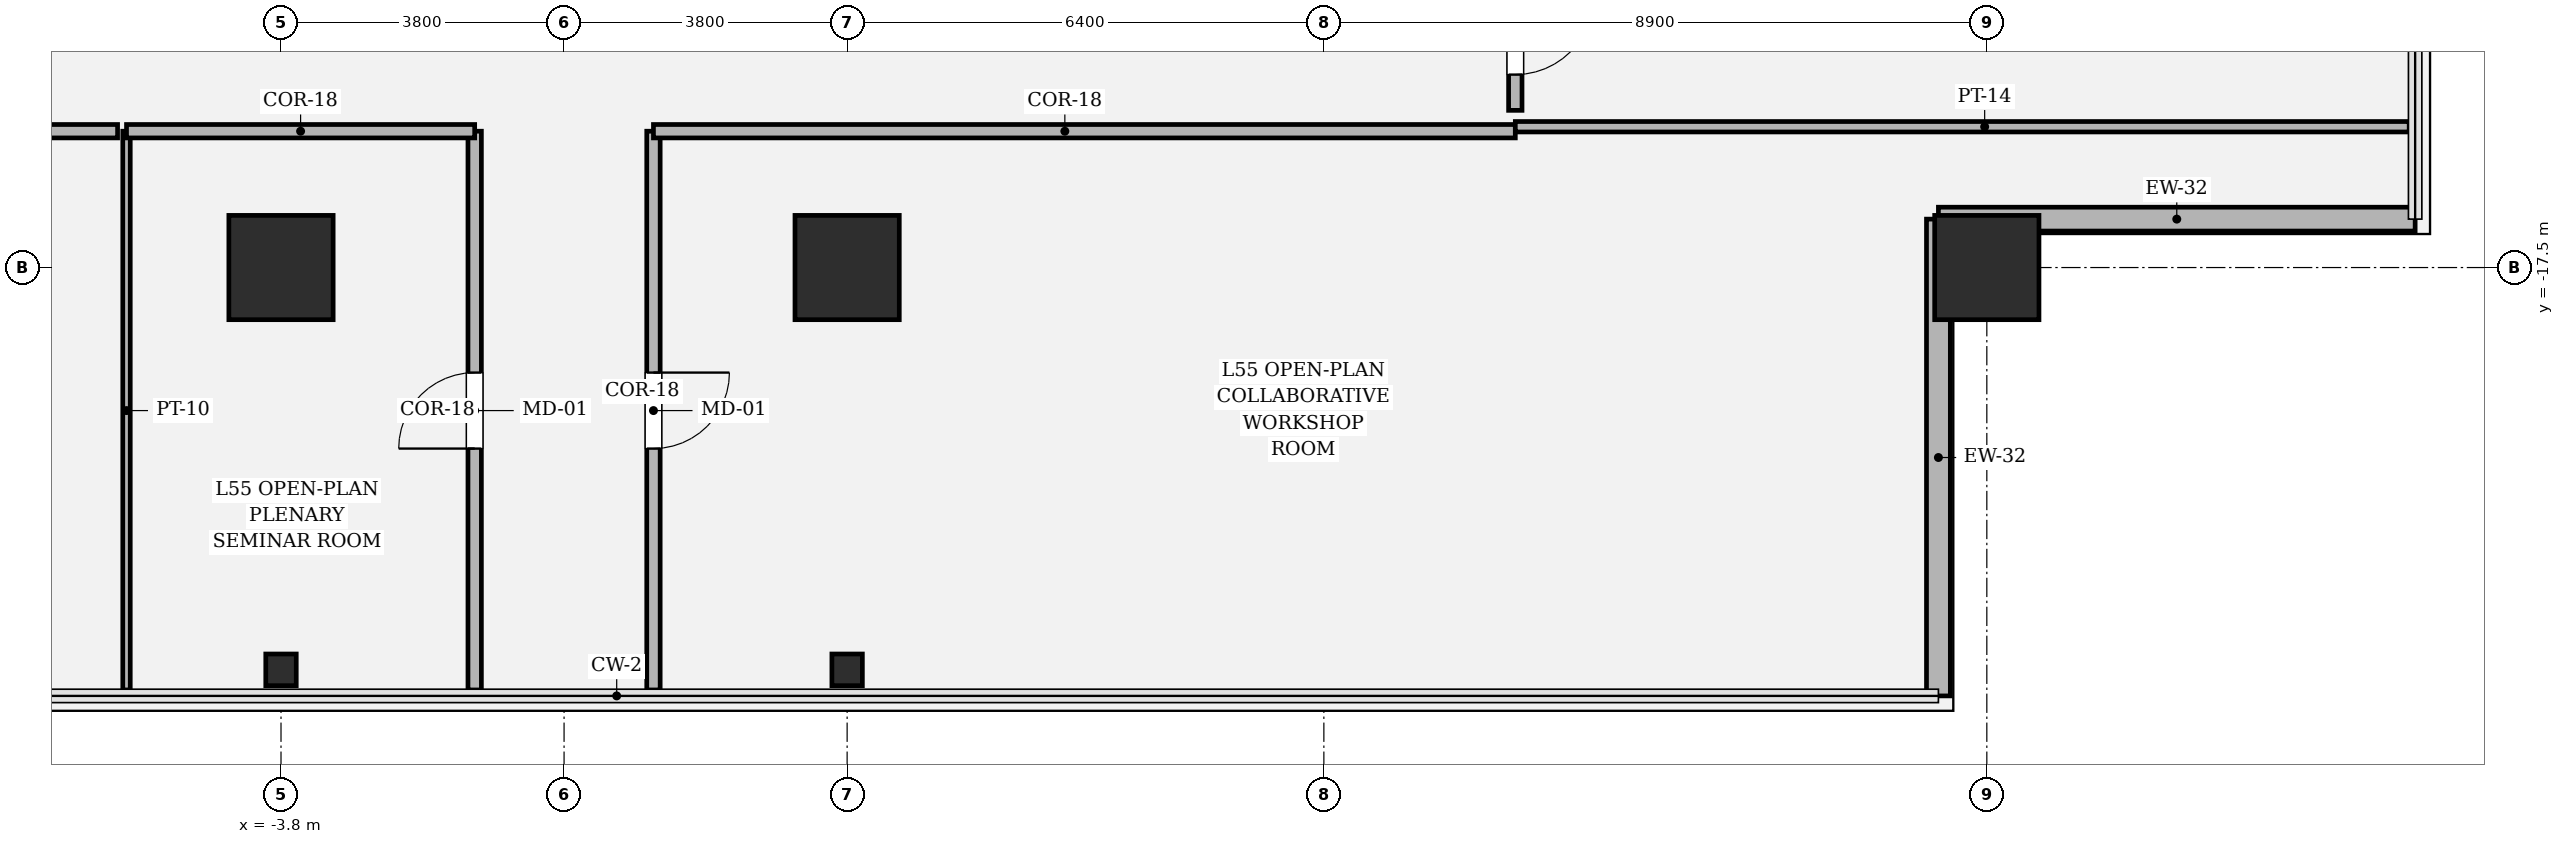
"""IFC4 building model, lengths in metres.
Left out: names, types, materials, properties, quantities, classifications, styles, units other than length and angle.
Written with IfcOpenShell. Run it as: python <this file> out.ifc"""

import sys

from ifc_helpers import new_model, si_unit, direction, frame, frame_2d, origin, origin_2d, place, context, subcontext, project, spatial, rectangle, hollow_rectangle, i_section, extrude, element, fill, save


model = new_model("IFC4")
c1 = context("Model", 3, precision=1e-05, world=origin(), true_north=direction((0.0, 1.0)))
c2 = subcontext(c1, "Body", "Model", "MODEL_VIEW")
j1 = project(units=[si_unit("LENGTHUNIT", "METRE"), si_unit("PLANEANGLEUNIT", "RADIAN")], contexts=[c1])
p1 = place(None, origin())
s1 = spatial("IfcSite", under=j1, at=p1, CompositionType="ELEMENT")
p2 = place(p1, origin())
s2 = spatial("IfcBuilding", under=s1, at=p2, CompositionType="ELEMENT")
p3 = place(p2, frame((0.0, 0.0, 232.95)))
s3 = spatial("IfcBuildingStorey", under=s2, at=p3, CompositionType="ELEMENT", Elevation=232.95)
for number, where, z_axis, x_axis in (
    (1, (-3.8, -17.5, 0.0), (0.0, 0.0, 1.0), (1.0, 0.0, 0.0)),
    (2, (3.8, -17.5, 0.0), (0.0, 0.0, 1.0), (1.0, 0.0, 0.0)),
    (3, (19.1, -17.5, 0.0), (0.0, 0.0, 1.0), (1.0, 0.0, 0.0)),
):
    element("IfcColumn", number, at=place(p3, frame(where, z_axis=z_axis, x_axis=x_axis)), inside=s3, PredefinedType="COLUMN", context=c2, shape_type="SweptSolid", body=[
        extrude(hollow_rectangle(XDim=1.4, YDim=1.4, WallThickness=0.042, at=origin_2d()), origin(), (0.0, 0.0, 1.0), 4.05),
    ])
for number, where, z_axis, x_axis in (
    (4, (-3.8, -22.9, 0.0), (0.0, 0.0, 1.0), (1.0, 0.0, 0.0)),
    (5, (3.8, -22.9, 0.0), (0.0, 0.0, 1.0), (1.0, 0.0, 0.0)),
):
    element("IfcColumn", number, at=place(p3, frame(where, z_axis=z_axis, x_axis=x_axis)), inside=s3, PredefinedType="COLUMN", context=c2, shape_type="SweptSolid", body=[
        extrude(i_section(OverallWidth=0.409, OverallDepth=0.425, WebThickness=0.032, FlangeThickness=0.052, FilletRadius=0.018, at=origin_2d()), origin(), (0.0, 0.0, 1.0), 4.048),
    ])
p4 = place(p3, frame((18.45, -23.25, 0.0), z_axis=(0.0, 0.0, 1.0), x_axis=(0.0, 1.0, 0.0)))
e6 = element("IfcWall", 6, at=p4, inside=s3, PredefinedType="SOLIDWALL", context=c2, shape_type="SweptSolid", body=[
    extrude(rectangle(XDim=6.4, YDim=0.32, at=frame_2d((3.2, 0.0))), origin(), (0.0, 0.0, 1.0), 2.404),
])
p5 = place(p3, frame((18.45, -16.85, 0.0), z_axis=(0.0, 0.0, 1.0), x_axis=(1.0, 0.0, 0.0)))
e7 = element("IfcWall", 7, at=p5, inside=s3, PredefinedType="SOLIDWALL", context=c2, shape_type="SweptSolid", body=[
    extrude(rectangle(XDim=6.4, YDim=0.32, at=frame_2d((3.2, 0.0))), origin(), (0.0, 0.0, 1.0), 2.404),
])
p6 = place(p3, frame((-1.2, -15.67, 0.0), z_axis=(0.0, 0.0, 1.0), x_axis=(0.0, -1.0, 0.0)))
e8 = element("IfcWall", 8, at=p6, inside=s3, PredefinedType="PARTITIONING", context=c2, shape_type="SweptSolid", body=[
    extrude(rectangle(XDim=7.5, YDim=0.18, at=frame_2d((3.75, 0.0))), origin(), (0.0, 0.0, 1.0), 2.404),
])
p7 = place(p6, frame((3.24, 0.0, 0.0)))
e9 = element("IfcOpeningElement", 9, at=p7, cuts=e8, PredefinedType="OPENING", context=c2, shape_type="SweptSolid", body=[
    extrude(rectangle(XDim=1.02, YDim=2.2, at=frame_2d((0.51, 1.1))), frame((0.0, 0.1, 0.0), z_axis=(0.0, -1.0, 0.0), x_axis=(1.0, 0.0, 0.0)), (0.0, 0.0, 1.0), 0.2),
])
p8 = place(p3, frame((-5.874, -23.17, 0.0), z_axis=(0.0, 0.0, 1.0), x_axis=(0.0, 1.0, 0.0)))
e10 = element("IfcWall", 10, at=p8, inside=s3, PredefinedType="PARTITIONING", context=c2, shape_type="SweptSolid", body=[
    extrude(rectangle(XDim=7.5, YDim=0.1, at=frame_2d((3.75, 0.0))), origin(), (0.0, 0.0, 1.0), 2.404),
])
p9 = place(p3, frame((-5.874, -15.67, 0.0), z_axis=(0.0, 0.0, 1.0), x_axis=(1.0, 0.0, 0.0)))
e11 = element("IfcWall", 11, at=p9, inside=s3, PredefinedType="PARTITIONING", context=c2, shape_type="SweptSolid", body=[
    extrude(rectangle(XDim=4.674, YDim=0.18, at=frame_2d((2.337, 0.0))), origin(), (0.0, 0.0, 1.0), 2.404),
])
p10 = place(p3, frame((-12.77, -15.67, 0.0), z_axis=(0.0, 0.0, 1.0), x_axis=(1.0, 0.0, 0.0)))
e12 = element("IfcWall", 12, at=p10, inside=s3, PredefinedType="PARTITIONING", context=c2, shape_type="SweptSolid", body=[
    extrude(rectangle(XDim=6.776, YDim=0.18, at=frame_2d((3.388, 0.0))), origin(), (0.0, 0.0, 1.0), 3.73),
])
p11 = place(p10, frame((2.688, 0.0, 0.0)))
e13 = element("IfcOpeningElement", 13, at=p11, cuts=e12, PredefinedType="OPENING", context=c2, shape_type="SweptSolid", body=[
    extrude(rectangle(XDim=1.4, YDim=2.25, at=frame_2d((0.7, 1.125))), frame((0.0, 0.1, 0.0), z_axis=(0.0, -1.0, 0.0), x_axis=(1.0, 0.0, 0.0)), (0.0, 0.0, 1.0), 0.2),
])
p12 = place(p3, frame((1.2, -23.17, 0.0), z_axis=(0.0, 0.0, 1.0), x_axis=(0.0, 1.0, 0.0)))
e14 = element("IfcWall", 14, at=p12, inside=s3, PredefinedType="PARTITIONING", context=c2, shape_type="SweptSolid", body=[
    extrude(rectangle(XDim=7.5, YDim=0.18, at=frame_2d((3.75, 0.0))), origin(), (0.0, 0.0, 1.0), 2.404),
])
p13 = place(p12, frame((3.24, 0.0, 0.0)))
e15 = element("IfcOpeningElement", 15, at=p13, cuts=e14, PredefinedType="OPENING", context=c2, shape_type="SweptSolid", body=[
    extrude(rectangle(XDim=1.02, YDim=2.2, at=frame_2d((0.51, 1.1))), frame((0.0, 0.1, 0.0), z_axis=(0.0, -1.0, 0.0), x_axis=(1.0, 0.0, 0.0)), (0.0, 0.0, 1.0), 0.2),
])
p14 = place(p3, frame((1.2, -15.67, 0.0), z_axis=(0.0, 0.0, 1.0), x_axis=(1.0, 0.0, 0.0)))
e16 = element("IfcWall", 16, at=p14, inside=s3, PredefinedType="PARTITIONING", context=c2, shape_type="SweptSolid", body=[
    extrude(rectangle(XDim=11.57, YDim=0.18, at=frame_2d((5.785, 0.0))), origin(), (0.0, 0.0, 1.0), 2.404),
])
p15 = place(p3, frame((12.77, -15.61, 0.0), z_axis=(0.0, 0.0, 1.0), x_axis=(1.0, 0.0, 0.0)))
e17 = element("IfcWall", 17, at=p15, inside=s3, PredefinedType="PARTITIONING", context=c2, shape_type="SweptSolid", body=[
    extrude(rectangle(XDim=12.0, YDim=0.14, at=frame_2d((6.0, 0.0))), origin(), (0.0, 0.0, 1.0), 2.404),
])
p16 = place(p3, frame((12.77, -15.39, 0.0), z_axis=(0.0, 0.0, 1.0), x_axis=(0.0, 1.0, 0.0)))
e18 = element("IfcWall", 18, at=p16, inside=s3, PredefinedType="PARTITIONING", context=c2, shape_type="SweptSolid", body=[
    extrude(rectangle(XDim=2.01, YDim=0.18, at=frame_2d((1.005, 0.0))), origin(), (0.0, 0.0, 1.0), 2.444),
])
p17 = place(p16, frame((0.48, 0.0, 0.0)))
e19 = element("IfcOpeningElement", 19, at=p17, cuts=e18, PredefinedType="OPENING", context=c2, shape_type="SweptSolid", body=[
    extrude(rectangle(XDim=1.05, YDim=2.2, at=frame_2d((0.525, 1.1))), frame((0.0, 0.1, 0.0), z_axis=(0.0, -1.0, 0.0), x_axis=(1.0, 0.0, 0.0)), (0.0, 0.0, 1.0), 0.2),
])
p18 = place(p7, origin())
e20 = element("IfcDoor", 20, at=p18, inside=s3, OperationType="SINGLE_SWING_RIGHT", PredefinedType="DOOR", context=c2, shape_type="SweptSolid", body=[
    extrude(rectangle(XDim=1.02, YDim=2.2, at=frame_2d((0.51, 1.1))), frame((0.0, 0.025, 0.0), z_axis=(0.0, -1.0, 0.0), x_axis=(1.0, 0.0, 0.0)), (0.0, 0.0, 1.0), 0.05),
])
fill(e9, e20)
p19 = place(p13, origin())
e21 = element("IfcDoor", 21, at=p19, inside=s3, OperationType="SINGLE_SWING_RIGHT", PredefinedType="DOOR", context=c2, shape_type="SweptSolid", body=[
    extrude(rectangle(XDim=1.02, YDim=2.2, at=frame_2d((0.51, 1.1))), frame((0.0, 0.025, 0.0), z_axis=(0.0, -1.0, 0.0), x_axis=(1.0, 0.0, 0.0)), (0.0, 0.0, 1.0), 0.05),
])
fill(e15, e21)
p20 = place(p17, origin())
e22 = element("IfcDoor", 22, at=p20, inside=s3, OperationType="SINGLE_SWING_RIGHT", PredefinedType="DOOR", context=c2, shape_type="SweptSolid", body=[
    extrude(rectangle(XDim=1.05, YDim=2.2, at=frame_2d((0.525, 1.1))), frame((0.0, 0.025, 0.0), z_axis=(0.0, -1.0, 0.0), x_axis=(1.0, 0.0, 0.0)), (0.0, 0.0, 1.0), 0.05),
])
fill(e19, e22)
save(model, sys.argv[1])
